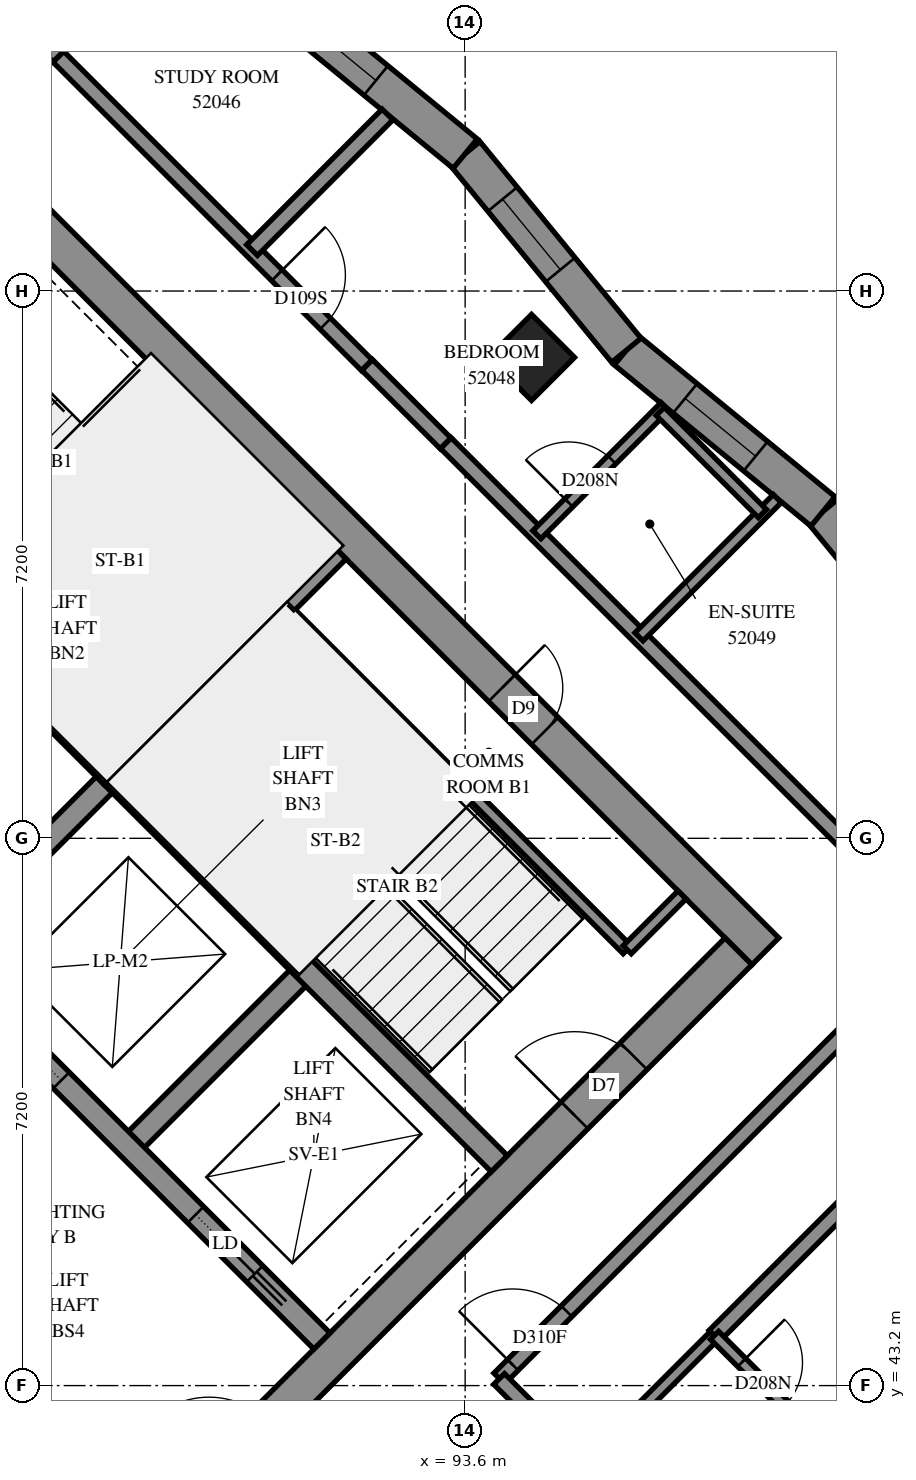
"""IFC4 building model, lengths in metres.
Left out: names, types, materials, properties, quantities, classifications, styles, units other than length and angle.
Written with IfcOpenShell. Run it as: python <this file> out.ifc"""

import sys

from ifc_helpers import new_model, si_unit, direction, frame, frame_2d, origin, origin_2d, place, context, subcontext, project, spatial, polyline, rectangle, outline, extrude, element, fill, save


model = new_model("IFC4")
c1 = context("Model", 3, precision=1e-05, world=origin(), true_north=direction((0.0, 1.0)))
c2 = subcontext(c1, "Body", "Model", "MODEL_VIEW")
j1 = project(units=[si_unit("LENGTHUNIT", "METRE"), si_unit("PLANEANGLEUNIT", "RADIAN")], contexts=[c1])
p1 = place(None, origin())
s1 = spatial("IfcSite", under=j1, at=p1, CompositionType="ELEMENT")
p2 = place(p1, origin())
s2 = spatial("IfcBuilding", under=s1, at=p2, CompositionType="ELEMENT")
p3 = place(p2, frame((0.0, 0.0, 193.0)))
s3 = spatial("IfcBuildingStorey", under=s2, at=p3, CompositionType="ELEMENT", Elevation=193.0)
p4 = place(p3, frame((94.474, 56.727, 0.0), z_axis=(0.0, 0.0, 1.0), x_axis=(0.7071067812, -0.7071067812, 0.0)))
e1 = element("IfcColumn", 1, at=p4, inside=s3, PredefinedType="COLUMN", context=c2, shape_type="SweptSolid", body=[
    extrude(rectangle(XDim=0.8, YDim=0.8, at=origin_2d()), origin(), (0.0, 0.0, 1.0), 3.1),
])
p5 = place(p3, frame((86.66, 59.802, -0.3), z_axis=(0.0, 0.0, 1.0), x_axis=(0.7071067812, -0.7071067812, 0.0)))
e2 = element("IfcWall", 2, at=p5, inside=s3, PredefinedType="SHEAR", context=c2, shape_type="SweptSolid", body=[
    extrude(rectangle(XDim=15.4, YDim=0.5, at=frame_2d((7.7, 0.0))), origin(), (0.0, 0.0, 1.0), 2.7),
])
p6 = place(p5, frame((10.5, 0.0, 0.3)))
e3 = element("IfcOpeningElement", 3, at=p6, cuts=e2, PredefinedType="OPENING", context=c2, shape_type="SweptSolid", body=[
    extrude(rectangle(XDim=0.8, YDim=2.1, at=frame_2d((0.4, 1.05))), frame((0.0, 0.26, 0.0), z_axis=(0.0, -1.0, 0.0), x_axis=(1.0, 0.0, 0.0)), (0.0, 0.0, 1.0), 0.52),
])
p7 = place(p3, frame((87.013, 38.731, -0.3), z_axis=(0.0, 0.0, 1.0), x_axis=(0.7071067812, 0.7071067812, 0.0)))
e4 = element("IfcWall", 4, at=p7, inside=s3, PredefinedType="SHEAR", context=c2, shape_type="SweptSolid", body=[
    extrude(rectangle(XDim=14.4, YDim=0.5, at=frame_2d((7.2, 0.0))), origin(), (0.0, 0.0, 1.0), 2.7),
])
p8 = place(p7, frame((4.55, 0.0, 0.3)))
e5 = element("IfcOpeningElement", 5, at=p8, cuts=e4, PredefinedType="OPENING", context=c2, shape_type="SweptSolid", body=[
    extrude(rectangle(XDim=1.1, YDim=2.1, at=frame_2d((0.55, 1.05))), frame((0.0, 0.26, 0.0), z_axis=(0.0, -1.0, 0.0), x_axis=(1.0, 0.0, 0.0)), (0.0, 0.0, 1.0), 0.52),
])
p9 = place(p7, frame((11.35, 0.0, 0.3)))
e6 = element("IfcOpeningElement", 6, at=p9, cuts=e4, PredefinedType="OPENING", context=c2, shape_type="SweptSolid", body=[
    extrude(rectangle(XDim=1.1, YDim=2.1, at=frame_2d((0.55, 1.05))), frame((0.0, 0.26, 0.0), z_axis=(0.0, -1.0, 0.0), x_axis=(1.0, 0.0, 0.0)), (0.0, 0.0, 1.0), 0.52),
])
for number, where, z_axis, x_axis in (
    (7, (86.625, 48.878, 0.0), (0.0, 0.0, 1.0), (0.707, 0.707, 0.0)),
    (8, (89.17, 46.332, 0.0), (0.0, 0.0, 1.0), (0.707, 0.707, 0.0)),
):
    element("IfcWall", number, at=place(p3, frame(where, z_axis=z_axis, x_axis=x_axis)), inside=s3, PredefinedType="SOLIDWALL", context=c2, shape_type="SweptSolid", body=[
        extrude(rectangle(XDim=3.3, YDim=0.3, at=frame_2d((1.65, 0.0))), origin(), (0.0, 0.0, 1.0), 3.1),
    ])
p10 = place(p3, frame((78.988, 51.423, 0.0), z_axis=(0.0, 0.0, 1.0), x_axis=(0.7071067812, -0.7071067812, 0.0)))
e9 = element("IfcWall", 9, at=p10, inside=s3, PredefinedType="SOLIDWALL", context=c2, shape_type="SweptSolid", body=[
    extrude(rectangle(XDim=14.4, YDim=0.3, at=frame_2d((7.2, 0.0))), origin(), (0.0, 0.0, 1.0), 3.1),
])
p11 = place(p10, frame((1.35, 0.0, 0.0)))
e10 = element("IfcOpeningElement", 10, at=p11, cuts=e9, PredefinedType="OPENING", context=c2, shape_type="SweptSolid", body=[
    extrude(rectangle(XDim=0.9, YDim=2.1, at=frame_2d((0.45, 1.05))), frame((0.0, 0.16, 0.0), z_axis=(0.0, -1.0, 0.0), x_axis=(1.0, 0.0, 0.0)), (0.0, 0.0, 1.0), 0.32),
])
p12 = place(p10, frame((4.95, 0.0, 0.0)))
e11 = element("IfcOpeningElement", 11, at=p12, cuts=e9, PredefinedType="OPENING", context=c2, shape_type="SweptSolid", body=[
    extrude(rectangle(XDim=0.9, YDim=2.1, at=frame_2d((0.45, 1.05))), frame((0.0, 0.16, 0.0), z_axis=(0.0, -1.0, 0.0), x_axis=(1.0, 0.0, 0.0)), (0.0, 0.0, 1.0), 0.32),
])
p13 = place(p10, frame((8.55, 0.0, 0.0)))
e12 = element("IfcOpeningElement", 12, at=p13, cuts=e9, PredefinedType="OPENING", context=c2, shape_type="SweptSolid", body=[
    extrude(rectangle(XDim=0.9, YDim=2.1, at=frame_2d((0.45, 1.05))), frame((0.0, 0.16, 0.0), z_axis=(0.0, -1.0, 0.0), x_axis=(1.0, 0.0, 0.0)), (0.0, 0.0, 1.0), 0.32),
])
p14 = place(p10, frame((12.05, 0.0, 0.0)))
e13 = element("IfcOpeningElement", 13, at=p14, cuts=e9, PredefinedType="OPENING", context=c2, shape_type="SweptSolid", body=[
    extrude(rectangle(XDim=1.1, YDim=2.1, at=frame_2d((0.55, 1.05))), frame((0.0, 0.16, 0.0), z_axis=(0.0, -1.0, 0.0), x_axis=(1.0, 0.0, 0.0)), (0.0, 0.0, 1.0), 0.32),
])
p15 = place(p3, frame((81.534, 53.969, 0.0), z_axis=(0.0, 0.0, 1.0), x_axis=(0.707103309, -0.7071102534, 0.0)))
e14 = element("IfcWall", 14, at=p15, inside=s3, PredefinedType="SOLIDWALL", context=c2, shape_type="SweptSolid", body=[
    extrude(rectangle(XDim=14.4, YDim=0.3, at=frame_2d((7.2, 0.0))), origin(), (0.0, 0.0, 1.0), 3.1),
])
p16 = place(p15, frame((1.25, 0.0, 0.0)))
e15 = element("IfcOpeningElement", 15, at=p16, cuts=e14, PredefinedType="OPENING", context=c2, shape_type="SweptSolid", body=[
    extrude(rectangle(XDim=1.1, YDim=2.1, at=frame_2d((0.55, 1.05))), frame((0.0, 0.16, 0.0), z_axis=(0.0, -1.0, 0.0), x_axis=(1.0, 0.0, 0.0)), (0.0, 0.0, 1.0), 0.32),
])
p17 = place(p15, frame((4.85, 0.0, 0.0)))
e16 = element("IfcOpeningElement", 16, at=p17, cuts=e14, PredefinedType="OPENING", context=c2, shape_type="SweptSolid", body=[
    extrude(rectangle(XDim=1.1, YDim=2.1, at=frame_2d((0.55, 1.05))), frame((0.0, 0.16, 0.0), z_axis=(0.0, -1.0, 0.0), x_axis=(1.0, 0.0, 0.0)), (0.0, 0.0, 1.0), 0.32),
])
p18 = place(p15, frame((8.45, 0.0, 0.0)))
e17 = element("IfcOpeningElement", 17, at=p18, cuts=e14, PredefinedType="OPENING", context=c2, shape_type="SweptSolid", body=[
    extrude(rectangle(XDim=1.1, YDim=2.1, at=frame_2d((0.55, 1.05))), frame((0.0, 0.16, 0.0), z_axis=(0.0, -1.0, 0.0), x_axis=(1.0, 0.0, 0.0)), (0.0, 0.0, 1.0), 0.32),
])
p19 = place(p15, frame((12.05, 0.0, 0.0)))
e18 = element("IfcOpeningElement", 18, at=p19, cuts=e14, PredefinedType="OPENING", context=c2, shape_type="SweptSolid", body=[
    extrude(rectangle(XDim=1.1, YDim=2.1, at=frame_2d((0.55, 1.05))), frame((0.0, 0.16, 0.0), z_axis=(0.0, -1.0, 0.0), x_axis=(1.0, 0.0, 0.0)), (0.0, 0.0, 1.0), 0.32),
])
for number, where, z_axis, x_axis in (
    (19, (83.867, 56.302, 0.0), (0.0, 0.0, 1.0), (0.707, -0.707, 0.0)),
    (20, (88.958, 51.211, 0.0), (0.0, 0.0, 1.0), (0.707, -0.707, 0.0)),
):
    element("IfcWall", number, at=place(p3, frame(where, z_axis=z_axis, x_axis=x_axis)), inside=s3, PredefinedType="SOLIDWALL", context=c2, shape_type="SweptSolid", body=[
        extrude(rectangle(XDim=7.2, YDim=0.3, at=frame_2d((3.6, 0.0))), origin(), (0.0, 0.0, 1.0), 3.1),
    ])
p20 = place(p3, frame((88.958, 51.211, 0.0), z_axis=(0.0, 0.0, 1.0), x_axis=(0.7071067812, 0.7071067812, 0.0)))
e21 = element("IfcWall", 21, at=p20, inside=s3, PredefinedType="SOLIDWALL", context=c2, shape_type="SweptSolid", body=[
    extrude(rectangle(XDim=4.2, YDim=0.3, at=frame_2d((2.1, 0.0))), origin(), (0.0, 0.0, 1.0), 3.1),
])
p21 = place(p3, frame((100.442, 52.097, 0.0), z_axis=(0.0, 0.0, 1.0), x_axis=(-0.6338845577, 0.7734276744, 0.0)))
e22 = element("IfcWall", 22, at=p21, inside=s3, PredefinedType="SOLIDWALL", context=c2, shape_type="SweptSolid", body=[
    extrude(outline(polyline([(0.047, -0.25), (3.392, -0.25), (3.342, 0.25), (-0.047, 0.25), (0.047, -0.25)])), origin(), (0.0, 0.0, 1.0), 3.1),
])
p22 = place(p21, frame((1.071, 0.0, 0.45)))
e23 = element("IfcOpeningElement", 23, at=p22, cuts=e22, PredefinedType="OPENING", context=c2, shape_type="SweptSolid", body=[
    extrude(rectangle(XDim=1.2, YDim=2.5, at=frame_2d((0.6, 1.25))), frame((0.0, 0.26, 0.0), z_axis=(0.0, -1.0, 0.0), x_axis=(1.0, 0.0, 0.0)), (0.0, 0.0, 1.0), 0.52),
])
p23 = place(p3, frame((98.308, 54.701, 0.0), z_axis=(0.0, 0.0, 1.0), x_axis=(-0.7734255065, 0.6338872028, 0.0)))
e24 = element("IfcWall", 24, at=p23, inside=s3, PredefinedType="SOLIDWALL", context=c2, shape_type="SweptSolid", body=[
    extrude(outline(polyline([(-0.025, -0.25), (3.32, -0.25), (3.369, 0.25), (0.025, 0.25), (-0.025, -0.25)])), origin(), (0.0, 0.0, 1.0), 3.1),
])
p24 = place(p23, frame((1.145, 0.0, 0.45)))
e25 = element("IfcOpeningElement", 25, at=p24, cuts=e24, PredefinedType="OPENING", context=c2, shape_type="SweptSolid", body=[
    extrude(rectangle(XDim=1.2, YDim=2.5, at=frame_2d((0.6, 1.25))), frame((0.0, 0.26, 0.0), z_axis=(0.0, -1.0, 0.0), x_axis=(1.0, 0.0, 0.0)), (0.0, 0.0, 1.0), 0.52),
])
p25 = place(p3, frame((95.721, 56.821, 0.0), z_axis=(0.0, 0.0, 1.0), x_axis=(-0.6338839759, 0.7734281512, 0.0)))
e26 = element("IfcWall", 26, at=p25, inside=s3, PredefinedType="SOLIDWALL", context=c2, shape_type="SweptSolid", body=[
    extrude(outline(polyline([(0.025, -0.25), (3.369, -0.25), (3.32, 0.25), (-0.025, 0.25), (0.025, -0.25)])), origin(), (0.0, 0.0, 1.0), 3.1),
])
p26 = place(p25, frame((1.369, 0.0, 0.45)))
e27 = element("IfcOpeningElement", 27, at=p26, cuts=e26, PredefinedType="OPENING", context=c2, shape_type="SweptSolid", body=[
    extrude(rectangle(XDim=1.2, YDim=2.5, at=frame_2d((0.6, 1.25))), frame((0.0, 0.26, 0.0), z_axis=(0.0, -1.0, 0.0), x_axis=(1.0, 0.0, 0.0)), (0.0, 0.0, 1.0), 0.52),
])
p27 = place(p3, frame((93.601, 59.408, 0.0), z_axis=(0.0, 0.0, 1.0), x_axis=(-0.7734255065, 0.6338872028, 0.0)))
e28 = element("IfcWall", 28, at=p27, inside=s3, PredefinedType="SOLIDWALL", context=c2, shape_type="SweptSolid", body=[
    extrude(outline(polyline([(-0.025, -0.25), (3.32, -0.25), (3.369, 0.25), (0.025, 0.25), (-0.025, -0.25)])), origin(), (0.0, 0.0, 1.0), 3.1),
])
p28 = place(p27, frame((1.518, 0.0, 0.45)))
e29 = element("IfcOpeningElement", 29, at=p28, cuts=e28, PredefinedType="OPENING", context=c2, shape_type="SweptSolid", body=[
    extrude(rectangle(XDim=1.2, YDim=2.5, at=frame_2d((0.6, 1.25))), frame((0.0, 0.26, 0.0), z_axis=(0.0, -1.0, 0.0), x_axis=(1.0, 0.0, 0.0)), (0.0, 0.0, 1.0), 0.52),
])
p29 = place(p3, frame((91.313, 53.354, 0.0), z_axis=(0.0, 0.0, 1.0), x_axis=(0.7071147811, -0.7070987812, 0.0)))
e30 = element("IfcWall", 30, at=p29, inside=s3, PredefinedType="PARTITIONING", context=c2, shape_type="SweptSolid", body=[
    extrude(rectangle(XDim=6.25, YDim=0.15, at=frame_2d((3.125, 0.0))), origin(), (0.0, 0.0, 1.0), 3.1),
])
p30 = place(p3, frame((95.732, 48.934, 0.0), z_axis=(0.0, 0.0, 1.0), x_axis=(0.7071067812, 0.7071067812, 0.0)))
e31 = element("IfcWall", 31, at=p30, inside=s3, PredefinedType="PARTITIONING", context=c2, shape_type="SweptSolid", body=[
    extrude(rectangle(XDim=1.02, YDim=0.15, at=frame_2d((0.51, 0.0))), origin(), (0.0, 0.0, 1.0), 3.1),
])
p31 = place(p3, frame((93.346, 55.599, 0.0), z_axis=(0.0, 0.0, 1.0), x_axis=(0.7071067812, -0.7071067812, 0.0)))
e32 = element("IfcWall", 32, at=p31, inside=s3, PredefinedType="PARTITIONING", context=c2, shape_type="SweptSolid", body=[
    extrude(rectangle(XDim=9.201, YDim=0.2, at=frame_2d((4.601, 0.0))), origin(), (0.0, 0.0, 1.0), 3.1),
])
p32 = place(p3, frame((94.049, 43.293, 0.0), z_axis=(0.0, 0.0, 1.0), x_axis=(0.7071067812, 0.7071067812, 0.0)))
e33 = element("IfcWall", 33, at=p32, inside=s3, PredefinedType="PARTITIONING", context=c2, shape_type="SweptSolid", body=[
    extrude(rectangle(XDim=8.2, YDim=0.2, at=frame_2d((4.1, 0.0))), origin(), (0.0, 0.0, 1.0), 3.1),
])
p33 = place(p32, frame((0.252, 0.0, 0.0)))
e34 = element("IfcOpeningElement", 34, at=p33, cuts=e33, PredefinedType="OPENING", context=c2, shape_type="SweptSolid", body=[
    extrude(rectangle(XDim=1.0, YDim=2.1, at=frame_2d((0.5, 1.05))), frame((0.0, 0.11, 0.0), z_axis=(0.0, -1.0, 0.0), x_axis=(1.0, 0.0, 0.0)), (0.0, 0.0, 1.0), 0.22),
])
p34 = place(p3, frame((88.247, 60.683, 0.0), z_axis=(0.0, 0.0, 1.0), x_axis=(0.7071067812, -0.7071067812, 0.0)))
e35 = element("IfcWall", 35, at=p34, inside=s3, PredefinedType="PARTITIONING", context=c2, shape_type="SweptSolid", body=[
    extrude(rectangle(XDim=5.742, YDim=0.2, at=frame_2d((2.871, 0.0))), origin(), (0.0, 0.0, 1.0), 3.1),
])
p35 = place(p34, frame((4.069, 0.0, 0.0)))
e36 = element("IfcOpeningElement", 36, at=p35, cuts=e35, PredefinedType="OPENING", context=c2, shape_type="SweptSolid", body=[
    extrude(rectangle(XDim=0.9, YDim=2.1, at=frame_2d((0.45, 1.05))), frame((0.0, 0.11, 0.0), z_axis=(0.0, -1.0, 0.0), x_axis=(1.0, 0.0, 0.0)), (0.0, 0.0, 1.0), 0.22),
])
p36 = place(p3, frame((94.047, 43.287, 0.0), z_axis=(0.0, 0.0, 1.0), x_axis=(0.7071067812, -0.7071067812, 0.0)))
e37 = element("IfcWall", 37, at=p36, inside=s3, PredefinedType="PARTITIONING", context=c2, shape_type="SweptSolid", body=[
    extrude(rectangle(XDim=5.199, YDim=0.2, at=frame_2d((2.599, 0.0))), origin(), (0.0, 0.0, 1.0), 3.1),
])
p37 = place(p36, frame((3.898, 0.0, 0.0)))
e38 = element("IfcOpeningElement", 38, at=p37, cuts=e37, PredefinedType="OPENING", context=c2, shape_type="SweptSolid", body=[
    extrude(rectangle(XDim=0.9, YDim=2.1, at=frame_2d((0.45, 1.05))), frame((0.0, 0.11, 0.0), z_axis=(0.0, -1.0, 0.0), x_axis=(1.0, 0.0, 0.0)), (0.0, 0.0, 1.0), 0.22),
])
p38 = place(p3, frame((96.88, 43.856, 0.0), z_axis=(0.0, 0.0, 1.0), x_axis=(0.7074098182, 0.7068036142, 0.0)))
e39 = element("IfcWall", 39, at=p38, inside=s3, PredefinedType="PARTITIONING", context=c2, shape_type="SweptSolid", body=[
    extrude(rectangle(XDim=3.299, YDim=0.2, at=frame_2d((1.65, 0.0))), origin(), (0.0, 0.0, 1.0), 3.1),
])
p39 = place(p3, frame((95.887, 53.051, 0.0), z_axis=(0.0, 0.0, 1.0), x_axis=(0.707087349, 0.7071262128, 0.0)))
e40 = element("IfcWall", 40, at=p39, inside=s3, PredefinedType="PARTITIONING", context=c2, shape_type="SweptSolid", body=[
    extrude(rectangle(XDim=2.573, YDim=0.15, at=frame_2d((1.287, 0.0))), origin(), (0.0, 0.0, 1.0), 3.1),
])
p40 = place(p3, frame((90.797, 58.139, 0.0), z_axis=(0.0, 0.0, 1.0), x_axis=(0.7066702589, 0.7075430342, 0.0)))
e41 = element("IfcWall", 41, at=p40, inside=s3, PredefinedType="PARTITIONING", context=c2, shape_type="SweptSolid", body=[
    extrude(rectangle(XDim=2.521, YDim=0.2, at=frame_2d((1.26, 0.0))), origin(), (0.0, 0.0, 1.0), 3.1),
])
p41 = place(p3, frame((95.179, 42.161, 0.0), z_axis=(0.0, 0.0, 1.0), x_axis=(0.7071067812, 0.7071067812, 0.0)))
e42 = element("IfcWall", 42, at=p41, inside=s3, PredefinedType="PARTITIONING", context=c2, shape_type="SweptSolid", body=[
    extrude(rectangle(XDim=2.401, YDim=0.15, at=frame_2d((1.201, 0.0))), origin(), (0.0, 0.0, 1.0), 3.1),
])
p42 = place(p3, frame((94.544, 54.394, 0.0), z_axis=(0.0, 0.0, 1.0), x_axis=(0.7071067812, 0.7071067812, 0.0)))
e43 = element("IfcWall", 43, at=p42, inside=s3, PredefinedType="PARTITIONING", context=c2, shape_type="SweptSolid", body=[
    extrude(rectangle(XDim=2.385, YDim=0.15, at=frame_2d((1.192, 0.0))), origin(), (0.0, 0.0, 1.0), 3.1),
])
p43 = place(p42, frame((0.594, 0.0, 0.0)))
e44 = element("IfcOpeningElement", 44, at=p43, cuts=e43, PredefinedType="OPENING", context=c2, shape_type="SweptSolid", body=[
    extrude(rectangle(XDim=0.8, YDim=2.1, at=frame_2d((0.4, 1.05))), frame((0.0, 0.085, 0.0), z_axis=(0.0, -1.0, 0.0), x_axis=(1.0, 0.0, 0.0)), (0.0, 0.0, 1.0), 0.17),
])
p44 = place(p3, frame((96.167, 56.017, 0.0), z_axis=(0.0, 0.0, 1.0), x_axis=(0.7071067812, -0.7071067812, 0.0)))
e45 = element("IfcWall", 45, at=p44, inside=s3, PredefinedType="PARTITIONING", context=c2, shape_type="SweptSolid", body=[
    extrude(rectangle(XDim=1.901, YDim=0.15, at=frame_2d((0.95, 0.0))), origin(), (0.0, 0.0, 1.0), 3.1),
])
p45 = place(p3, frame((96.881, 43.861, 0.0), z_axis=(0.0, 0.0, 1.0), x_axis=(0.7071067812, -0.7071067812, 0.0)))
e46 = element("IfcWall", 46, at=p45, inside=s3, PredefinedType="PARTITIONING", context=c2, shape_type="SweptSolid", body=[
    extrude(rectangle(XDim=1.901, YDim=0.15, at=frame_2d((0.95, 0.0))), origin(), (0.0, 0.0, 1.0), 3.1),
])
p46 = place(p45, frame((0.505, 0.0, 0.0)))
e47 = element("IfcOpeningElement", 47, at=p46, cuts=e46, PredefinedType="OPENING", context=c2, shape_type="SweptSolid", body=[
    extrude(rectangle(XDim=0.8, YDim=2.1, at=frame_2d((0.4, 1.05))), frame((0.0, 0.085, 0.0), z_axis=(0.0, -1.0, 0.0), x_axis=(1.0, 0.0, 0.0)), (0.0, 0.0, 1.0), 0.17),
])
p47 = place(p3, frame((92.311, 56.627, 0.0), z_axis=(0.0, 0.0, 1.0), x_axis=(0.7077922938, -0.7064206033, 0.0)))
e48 = element("IfcWall", 48, at=p47, inside=s3, PredefinedType="PARTITIONING", context=c2, shape_type="SweptSolid", body=[
    extrude(rectangle(XDim=1.458, YDim=0.2, at=frame_2d((0.729, 0.0))), origin(), (0.0, 0.0, 1.0), 3.1),
])
p48 = place(p3, frame((87.899, 61.041, 0.0), z_axis=(0.0, 0.0, 1.0), x_axis=(0.7051008166, -0.7091070712, 0.0)))
e49 = element("IfcWall", 49, at=p48, inside=s3, PredefinedType="PARTITIONING", context=c2, shape_type="SweptSolid", body=[
    extrude(rectangle(XDim=0.499, YDim=0.2, at=frame_2d((0.25, 0.0))), origin(), (0.0, 0.0, 1.0), 3.1),
])
p49 = place(p24, origin())
e50 = element("IfcWindow", 50, at=p49, inside=s3, PartitioningType="SINGLE_PANEL", PredefinedType="WINDOW", context=c2, shape_type="SweptSolid", body=[
    extrude(rectangle(XDim=1.2, YDim=2.5, at=frame_2d((0.6, 1.25))), frame((0.0, 0.18, 0.0), z_axis=(0.0, -1.0, 0.0), x_axis=(1.0, 0.0, 0.0)), (0.0, 0.0, 1.0), 0.06),
])
fill(e25, e50)
p50 = place(p26, origin())
e51 = element("IfcWindow", 51, at=p50, inside=s3, PartitioningType="SINGLE_PANEL", PredefinedType="WINDOW", context=c2, shape_type="SweptSolid", body=[
    extrude(rectangle(XDim=1.2, YDim=2.5, at=frame_2d((0.6, 1.25))), frame((0.0, 0.18, 0.0), z_axis=(0.0, -1.0, 0.0), x_axis=(1.0, 0.0, 0.0)), (0.0, 0.0, 1.0), 0.06),
])
fill(e27, e51)
p51 = place(p28, origin())
e52 = element("IfcWindow", 52, at=p51, inside=s3, PartitioningType="SINGLE_PANEL", PredefinedType="WINDOW", context=c2, shape_type="SweptSolid", body=[
    extrude(rectangle(XDim=1.2, YDim=2.5, at=frame_2d((0.6, 1.25))), frame((0.0, 0.18, 0.0), z_axis=(0.0, -1.0, 0.0), x_axis=(1.0, 0.0, 0.0)), (0.0, 0.0, 1.0), 0.06),
])
fill(e29, e52)
p52 = place(p6, origin())
e53 = element("IfcDoor", 53, at=p52, inside=s3, OperationType="SINGLE_SWING_RIGHT", PredefinedType="DOOR", context=c2, shape_type="SweptSolid", body=[
    extrude(rectangle(XDim=0.8, YDim=2.1, at=frame_2d((0.4, 1.05))), frame((0.0, 0.025, 0.0), z_axis=(0.0, -1.0, 0.0), x_axis=(1.0, 0.0, 0.0)), (0.0, 0.0, 1.0), 0.05),
])
fill(e3, e53)
p53 = place(p9, origin())
e54 = element("IfcDoor", 54, at=p53, inside=s3, OperationType="SINGLE_SWING_RIGHT", PredefinedType="DOOR", context=c2, shape_type="SweptSolid", body=[
    extrude(rectangle(XDim=1.1, YDim=2.1, at=frame_2d((0.55, 1.05))), frame((0.0, 0.025, 0.0), z_axis=(0.0, -1.0, 0.0), x_axis=(1.0, 0.0, 0.0)), (0.0, 0.0, 1.0), 0.05),
])
fill(e6, e54)
p54 = place(p18, origin())
e55 = element("IfcDoor", 55, at=p54, inside=s3, OperationType="SLIDING_TO_LEFT", PredefinedType="DOOR", context=c2, shape_type="SweptSolid", body=[
    extrude(rectangle(XDim=1.1, YDim=2.1, at=frame_2d((0.55, 1.05))), frame((0.0, 0.025, 0.0), z_axis=(0.0, -1.0, 0.0), x_axis=(1.0, 0.0, 0.0)), (0.0, 0.0, 1.0), 0.05),
])
fill(e17, e55)
p55 = place(p19, origin())
e56 = element("IfcDoor", 56, at=p55, inside=s3, OperationType="SLIDING_TO_RIGHT", PredefinedType="DOOR", context=c2, shape_type="SweptSolid", body=[
    extrude(rectangle(XDim=1.1, YDim=2.1, at=frame_2d((0.55, 1.05))), frame((0.0, 0.025, 0.0), z_axis=(0.0, -1.0, 0.0), x_axis=(1.0, 0.0, 0.0)), (0.0, 0.0, 1.0), 0.05),
])
fill(e18, e56)
p56 = place(p33, origin())
e57 = element("IfcDoor", 57, at=p56, inside=s3, OperationType="SINGLE_SWING_RIGHT", PredefinedType="DOOR", context=c2, shape_type="SweptSolid", body=[
    extrude(rectangle(XDim=1.0, YDim=2.1, at=frame_2d((0.5, 1.05))), frame((0.0, 0.025, 0.0), z_axis=(0.0, -1.0, 0.0), x_axis=(1.0, 0.0, 0.0)), (0.0, 0.0, 1.0), 0.05),
])
fill(e34, e57)
p57 = place(p35, origin())
e58 = element("IfcDoor", 58, at=p57, inside=s3, OperationType="SINGLE_SWING_RIGHT", PredefinedType="DOOR", context=c2, shape_type="SweptSolid", body=[
    extrude(rectangle(XDim=0.9, YDim=2.1, at=frame_2d((0.45, 1.05))), frame((0.0, 0.025, 0.0), z_axis=(0.0, -1.0, 0.0), x_axis=(1.0, 0.0, 0.0)), (0.0, 0.0, 1.0), 0.05),
])
fill(e36, e58)
p58 = place(p43, origin())
e59 = element("IfcDoor", 59, at=p58, inside=s3, OperationType="SINGLE_SWING_RIGHT", PredefinedType="DOOR", context=c2, shape_type="SweptSolid", body=[
    extrude(rectangle(XDim=0.8, YDim=2.1, at=frame_2d((0.4, 1.05))), frame((0.0, 0.025, 0.0), z_axis=(0.0, -1.0, 0.0), x_axis=(1.0, 0.0, 0.0)), (0.0, 0.0, 1.0), 0.05),
])
fill(e44, e59)
p59 = place(p46, origin())
e60 = element("IfcDoor", 60, at=p59, inside=s3, OperationType="SINGLE_SWING_RIGHT", PredefinedType="DOOR", context=c2, shape_type="SweptSolid", body=[
    extrude(rectangle(XDim=0.8, YDim=2.1, at=frame_2d((0.4, 1.05))), frame((0.0, 0.025, 0.0), z_axis=(0.0, -1.0, 0.0), x_axis=(1.0, 0.0, 0.0)), (0.0, 0.0, 1.0), 0.05),
])
fill(e47, e60)
save(model, sys.argv[1])
